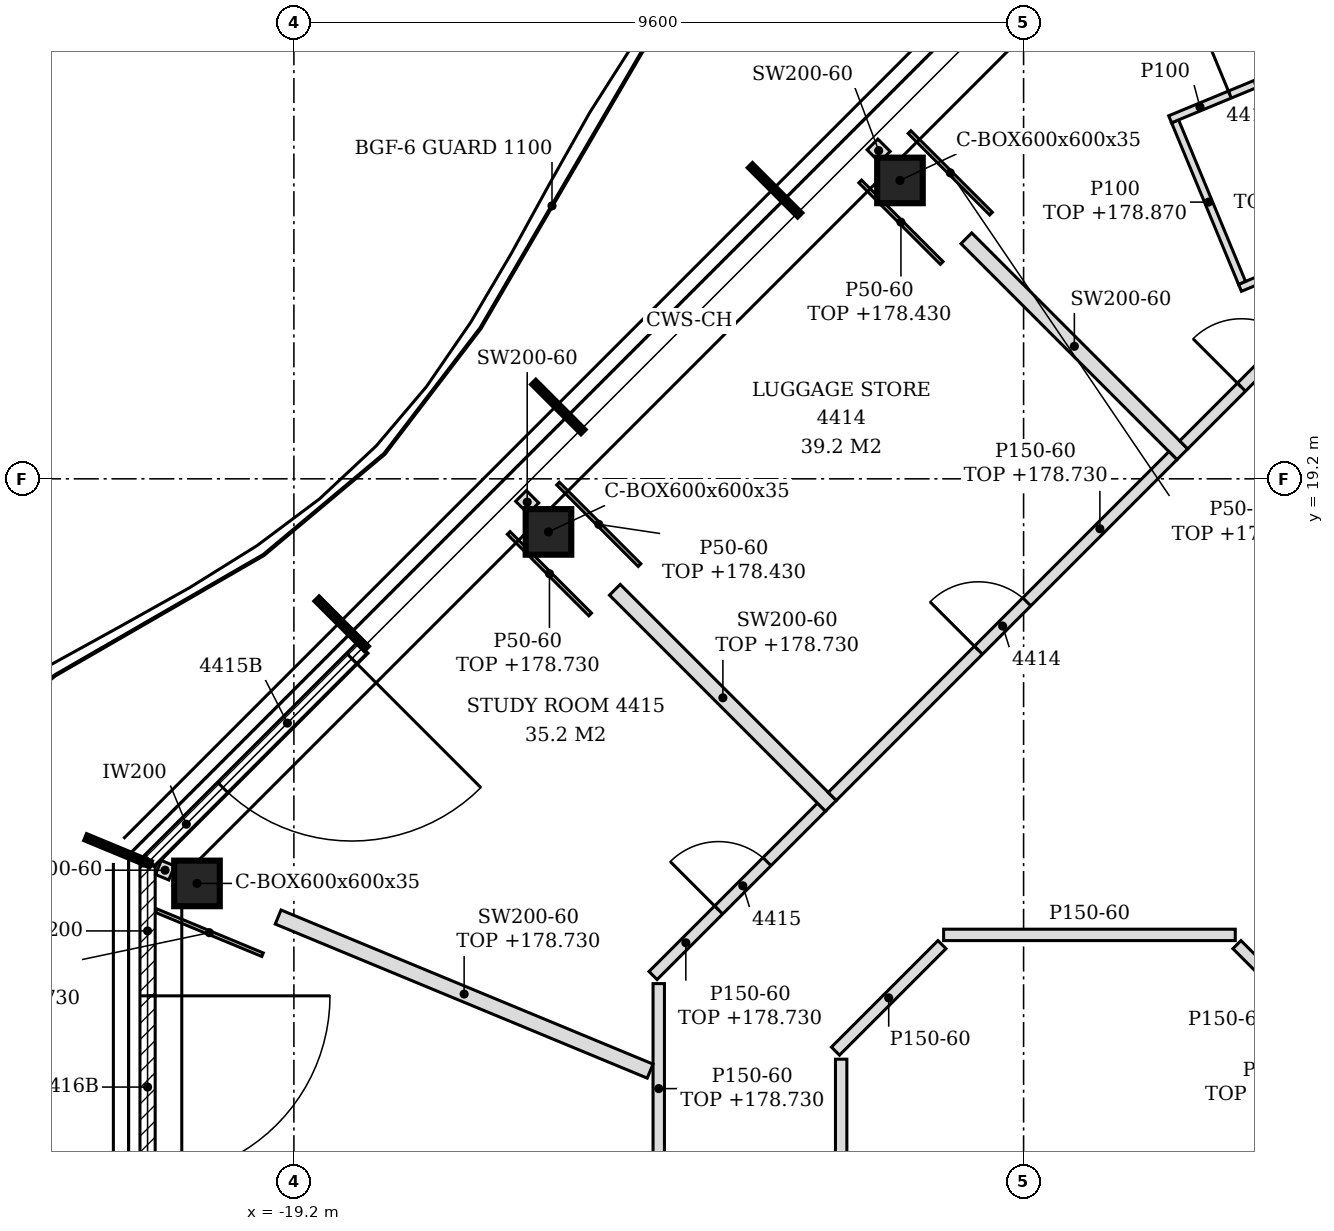
"""IFC4 building model, lengths in metres.
Left out: names, types, materials, properties, quantities, classifications, styles, units other than length and angle.
Written with IfcOpenShell. Run it as: python <this file> out.ifc"""

import sys

from ifc_helpers import new_model, si_unit, direction, frame, frame_2d, origin, origin_2d, place, context, subcontext, project, spatial, polyline, rectangle, hollow_rectangle, outline, extrude, clip, halfspace, element, fill, save


model = new_model("IFC4")
c1 = context("Model", 3, precision=1e-05, world=origin(), true_north=direction((0.0, 1.0)))
c2 = subcontext(c1, "Body", "Model", "MODEL_VIEW")
j1 = project(units=[si_unit("LENGTHUNIT", "METRE"), si_unit("PLANEANGLEUNIT", "RADIAN")], contexts=[c1])
p1 = place(None, origin())
s1 = spatial("IfcSite", under=j1, at=p1, CompositionType="ELEMENT")
p2 = place(p1, origin())
s2 = spatial("IfcBuilding", under=s1, at=p2, CompositionType="ELEMENT")
p3 = place(p2, frame((0.0, 0.0, 175.8)))
s3 = spatial("IfcBuildingStorey", under=s2, at=p3, CompositionType="ELEMENT", Elevation=175.8)
for number, where, z_axis, x_axis in (
    (1, (-11.227, 23.126, -0.15), (0.183, -0.122, 0.976), (0.555, 0.832, 0.0)),
    (2, (-15.851, 18.501, -0.15), (0.183, -0.122, 0.976), (0.555, 0.832, 0.0)),
    (3, (-20.475, 13.877, -0.15), (0.183, -0.122, 0.976), (0.555, 0.832, 0.0)),
):
    element("IfcColumn", number, at=place(p3, frame(where, z_axis=z_axis, x_axis=x_axis)), inside=s3, PredefinedType="COLUMN", context=c2, shape_type="Clipping", body=[
        clip(clip(extrude(hollow_rectangle(XDim=0.6, YDim=0.6, WallThickness=0.035, at=origin_2d()), origin(), (0.0, 0.0, 1.0), 3.69), halfspace(frame((0.0, 0.0, 0.022), z_axis=(0.0, 0.0, 1.0), x_axis=(1.0, 0.0, 0.0)), True)), halfspace(frame((0.0, 0.0, 3.67), z_axis=(0.0, 0.0, 1.0), x_axis=(1.0, 0.0, 0.0)), False)),
    ])
p4 = place(p3, frame((-18.295, 16.976, 0.0), z_axis=(0.0, 0.0, 1.0), x_axis=(-0.707137595296, -0.707075965734, 0.0)))
e4 = element("IfcWall", 4, at=p4, inside=s3, PredefinedType="NOTDEFINED", context=c2, shape_type="SweptSolid", body=[
    extrude(rectangle(XDim=3.961, YDim=0.2, at=frame_2d((1.981, 0.0))), origin(), (0.0, 0.0, 1.0), 3.45),
])
p5 = place(p4, frame((0.2, 0.0, 0.0)))
e5 = element("IfcOpeningElement", 5, at=p5, cuts=e4, PredefinedType="OPENING", context=c2, shape_type="SweptSolid", body=[
    extrude(rectangle(XDim=2.4, YDim=2.4, at=frame_2d((1.2, 1.2))), frame((0.0, 0.11, 0.0), z_axis=(0.0, -1.0, 0.0), x_axis=(1.0, 0.0, 0.0)), (0.0, 0.0, 1.0), 0.22),
])
p6 = place(p3, frame((-21.125, 14.106, 0.0), z_axis=(0.0, 0.0, 1.0), x_axis=(0.0, -1.0, 0.0)))
e6 = element("IfcWall", 6, at=p6, inside=s3, PredefinedType="NOTDEFINED", context=c2, shape_type="SweptSolid", body=[
    extrude(rectangle(XDim=4.626, YDim=0.2, at=frame_2d((2.313, 0.0))), origin(), (0.0, 0.0, 1.0), 3.45),
])
p7 = place(p6, frame((1.708, 0.0, 0.0)))
e7 = element("IfcOpeningElement", 7, at=p7, cuts=e6, PredefinedType="OPENING", context=c2, shape_type="SweptSolid", body=[
    extrude(rectangle(XDim=2.4, YDim=2.4, at=frame_2d((1.2, 1.2))), frame((0.0, 0.11, 0.0), z_axis=(0.0, -1.0, 0.0), x_axis=(1.0, 0.0, 0.0)), (0.0, 0.0, 1.0), 0.22),
])
p8 = place(p3, frame((-12.0, -1.125, 0.0), z_axis=(0.0, 0.0, 1.0), x_axis=(0.0, 1.0, 0.0)))
e8 = element("IfcWall", 8, at=p8, inside=s3, PredefinedType="PARTITIONING", context=c2, shape_type="SweptSolid", body=[
    extrude(outline(polyline([(0.0, 0.0), (12.69, 0.0), (12.69, 3.45), (10.225, 3.45), (10.223, 2.93), (10.025, 2.93), (10.023, 3.45), (5.425, 3.45), (5.423, 2.93), (5.225, 2.93), (5.223, 3.45), (0.625, 3.45), (0.623, 2.93), (0.425, 2.93), (0.423, 3.45), (0.0, 3.45), (0.0, 0.0)])), frame((0.0, 0.075, 0.0), z_axis=(0.0, -1.0, 0.0), x_axis=(1.0, 0.0, 0.0)), (0.0, 0.0, 1.0), 0.15),
])
p9 = place(p3, frame((-14.4, 9.796, 0.0), z_axis=(0.0, 0.0, 1.0), x_axis=(0.0, 1.0, 0.0)))
e9 = element("IfcWall", 9, at=p9, inside=s3, PredefinedType="PARTITIONING", context=c2, shape_type="SweptSolid", body=[
    extrude(rectangle(XDim=2.763, YDim=0.15, at=frame_2d((1.381, 0.0))), origin(), (0.0, 0.0, 1.0), 2.93),
])
p10 = place(p3, frame((-14.513, 11.408, 0.0), z_axis=(0.0, 0.0, 1.0), x_axis=(-0.923884829347, 0.382670644421, 0.0)))
e10 = element("IfcWall", 10, at=p10, inside=s3, PredefinedType="PARTITIONING", context=c2, shape_type="SweptSolid", body=[
    extrude(rectangle(XDim=5.297, YDim=0.2, at=frame_2d((2.649, 0.0))), origin(), (0.0, 0.0, 1.0), 2.93),
])
p11 = place(p3, frame((-12.075, 11.671, 0.0), z_axis=(0.0, 0.0, 1.0), x_axis=(0.707045167735, 0.70716838927, 0.0)))
e11 = element("IfcWall", 11, at=p11, inside=s3, PredefinedType="PARTITIONING", context=c2, shape_type="SweptSolid", body=[
    extrude(rectangle(XDim=1.981, YDim=0.15, at=frame_2d((0.991, 0.0))), origin(), (0.0, 0.0, 1.0), 3.45),
])
p12 = place(p3, frame((-5.914, 12.192, 0.0), z_axis=(0.0, 0.0, 1.0), x_axis=(-0.706812296552, 0.70740114323, 0.0)))
e12 = element("IfcWall", 12, at=p12, inside=s3, PredefinedType="PARTITIONING", context=c2, shape_type="SweptSolid", body=[
    extrude(rectangle(XDim=1.244, YDim=0.15, at=frame_2d((0.622, 0.0))), origin(), (0.0, 0.0, 1.0), 3.45),
])
p13 = place(p3, frame((-14.475, 12.665, 0.0), z_axis=(0.0, 0.0, 1.0), x_axis=(0.70726258305, 0.706950944987, 0.0)))
e13 = element("IfcWall", 13, at=p13, inside=s3, PredefinedType="PARTITIONING", context=c2, shape_type="SweptSolid", body=[
    extrude(rectangle(XDim=3.134, YDim=0.15, at=frame_2d((1.567, 0.0))), origin(), (0.0, 0.0, 1.0), 2.93),
])
p14 = place(p13, frame((1.22, 0.0, 0.0)))
e14 = element("IfcOpeningElement", 14, at=p14, cuts=e13, PredefinedType="OPENING", context=c2, shape_type="SweptSolid", body=[
    extrude(rectangle(XDim=0.9, YDim=2.1, at=frame_2d((0.45, 1.05))), frame((0.0, 0.085, 0.0), z_axis=(0.0, -1.0, 0.0), x_axis=(1.0, 0.0, 0.0)), (0.0, 0.0, 1.0), 0.17),
])
p15 = place(p3, frame((-10.652, 13.2, 0.0), z_axis=(0.0, 0.0, 1.0), x_axis=(1.0, 0.0, 0.0)))
e15 = element("IfcWall", 15, at=p15, inside=s3, PredefinedType="PARTITIONING", context=c2, shape_type="SweptSolid", body=[
    extrude(rectangle(XDim=3.837, YDim=0.15, at=frame_2d((1.918, 0.0))), origin(), (0.0, 0.0, 1.0), 3.45),
])
p16 = place(p3, frame((-20.808, 14.015, 0.0), z_axis=(0.0, 0.0, 1.0), x_axis=(-0.92368644112, 0.383149263984, 0.0)))
e16 = element("IfcWall", 16, at=p16, inside=s3, PredefinedType="PARTITIONING", context=c2, shape_type="SweptSolid", body=[
    extrude(rectangle(XDim=0.189, YDim=0.2, at=frame_2d((0.095, 0.0))), origin(), (0.0, 0.0, 1.0), 3.45),
])
p17 = place(p3, frame((-12.135, 14.898, 0.0), z_axis=(0.0, 0.0, 1.0), x_axis=(-0.707106781187, 0.707106781187, 0.0)))
e17 = element("IfcWall", 17, at=p17, inside=s3, PredefinedType="PARTITIONING", context=c2, shape_type="SweptSolid", body=[
    extrude(rectangle(XDim=4.02, YDim=0.2, at=frame_2d((2.01, 0.0))), origin(), (0.0, 0.0, 1.0), 2.93),
])
p18 = place(p3, frame((-12.117, 15.022, 0.0), z_axis=(0.0, 0.0, 1.0), x_axis=(0.70701050414, 0.707203045127, 0.0)))
e18 = element("IfcWall", 18, at=p18, inside=s3, PredefinedType="PARTITIONING", context=c2, shape_type="SweptSolid", body=[
    extrude(rectangle(XDim=6.34, YDim=0.15, at=frame_2d((3.17, 0.0))), origin(), (0.0, 0.0, 1.0), 2.93),
])
p19 = place(p18, frame((2.72, 0.0, 0.0)))
e19 = element("IfcOpeningElement", 19, at=p19, cuts=e18, PredefinedType="OPENING", context=c2, shape_type="SweptSolid", body=[
    extrude(rectangle(XDim=0.9, YDim=2.1, at=frame_2d((0.45, 1.05))), frame((0.0, 0.085, 0.0), z_axis=(0.0, -1.0, 0.0), x_axis=(1.0, 0.0, 0.0)), (0.0, 0.0, 1.0), 0.17),
])
p20 = place(p3, frame((-16.049, 18.812, 0.0), z_axis=(0.0, 0.0, 1.0), x_axis=(-0.707637841256, 0.706575321974, 0.0)))
e20 = element("IfcWall", 20, at=p20, inside=s3, PredefinedType="PARTITIONING", context=c2, shape_type="SweptSolid", body=[
    extrude(rectangle(XDim=0.23, YDim=0.2, at=frame_2d((0.115, 0.0))), origin(), (0.0, 0.0, 1.0), 3.45),
])
p21 = place(p3, frame((-7.511, 19.523, 0.0), z_axis=(0.0, 0.0, 1.0), x_axis=(-0.707167526582, 0.707046030572, 0.0)))
e21 = element("IfcWall", 21, at=p21, inside=s3, PredefinedType="PARTITIONING", context=c2, shape_type="SweptSolid", body=[
    extrude(rectangle(XDim=4.019, YDim=0.2, at=frame_2d((2.009, 0.0))), origin(), (0.0, 0.0, 1.0), 3.45),
])
p22 = place(p3, frame((-7.493, 19.647, 0.0), z_axis=(0.0, 0.0, 1.0), x_axis=(0.707136494677, 0.707077066448, 0.0)))
e22 = element("IfcWall", 22, at=p22, inside=s3, PredefinedType="PARTITIONING", context=c2, shape_type="SweptSolid", body=[
    extrude(rectangle(XDim=4.108, YDim=0.15, at=frame_2d((2.054, 0.0))), origin(), (0.0, 0.0, 1.0), 2.73),
])
p23 = place(p22, frame((1.074, 0.0, 0.0)))
e23 = element("IfcOpeningElement", 23, at=p23, cuts=e22, PredefinedType="OPENING", context=c2, shape_type="SweptSolid", body=[
    extrude(rectangle(XDim=0.9, YDim=2.1, at=frame_2d((0.45, 1.05))), frame((0.0, 0.085, 0.0), z_axis=(0.0, -1.0, 0.0), x_axis=(1.0, 0.0, 0.0)), (0.0, 0.0, 1.0), 0.17),
])
p24 = place(p3, frame((-6.753, 21.713, 0.0), z_axis=(0.0, 0.0, 1.0), x_axis=(0.923907921622, 0.382614887798, 0.0)))
e24 = element("IfcWall", 24, at=p24, inside=s3, PredefinedType="PARTITIONING", context=c2, shape_type="SweptSolid", body=[
    extrude(rectangle(XDim=2.349, YDim=0.1, at=frame_2d((1.175, 0.0))), origin(), (0.0, 0.0, 1.0), 2.73),
])
p25 = place(p3, frame((-6.726, 21.778, 0.0), z_axis=(0.0, 0.0, 1.0), x_axis=(-0.382911179632, 0.923785163614, 0.0)))
e25 = element("IfcWall", 25, at=p25, inside=s3, PredefinedType="PARTITIONING", context=c2, shape_type="SweptSolid", body=[
    extrude(rectangle(XDim=2.3, YDim=0.1, at=frame_2d((1.15, 0.0))), origin(), (0.0, 0.0, 1.0), 3.07),
])
p26 = place(p3, frame((-11.425, 23.437, 0.0), z_axis=(0.0, 0.0, 1.0), x_axis=(-0.707637841256, 0.706575321974, 0.0)))
e26 = element("IfcWall", 26, at=p26, inside=s3, PredefinedType="PARTITIONING", context=c2, shape_type="SweptSolid", body=[
    extrude(rectangle(XDim=0.23, YDim=0.2, at=frame_2d((0.115, 0.0))), origin(), (0.0, 0.0, 1.0), 3.45),
])
p27 = place(p3, frame((-7.672, 23.93, 0.0), z_axis=(0.0, 0.0, 1.0), x_axis=(0.923968736757, 0.382468003231, 0.0)))
e27 = element("IfcWall", 27, at=p27, inside=s3, PredefinedType="PARTITIONING", context=c2, shape_type="SweptSolid", body=[
    extrude(rectangle(XDim=2.35, YDim=0.1, at=frame_2d((1.175, 0.0))), origin(), (0.0, 0.0, 1.0), 3.45),
])
p28 = place(p27, frame((0.851, 0.0, 0.0)))
e28 = element("IfcOpeningElement", 28, at=p28, cuts=e27, PredefinedType="OPENING", context=c2, shape_type="SweptSolid", body=[
    extrude(rectangle(XDim=0.8, YDim=2.1, at=frame_2d((0.4, 1.05))), frame((0.0, 0.06, 0.0), z_axis=(0.0, -1.0, 0.0), x_axis=(1.0, 0.0, 0.0)), (0.0, 0.0, 1.0), 0.12),
])
p29 = place(p3, frame((-19.613, 12.939, 0.0), z_axis=(0.0, 0.0, 1.0), x_axis=(-0.923851894913, 0.382750148616, 0.0)))
e29 = element("IfcWall", 29, at=p29, inside=s3, PredefinedType="PARTITIONING", context=c2, shape_type="SweptSolid", body=[
    extrude(rectangle(XDim=1.516, YDim=0.05, at=frame_2d((0.758, 0.0))), origin(), (0.0, 0.0, 1.0), 2.93),
])
p30 = place(p3, frame((-15.302, 17.416, 0.0), z_axis=(0.0, 0.0, 1.0), x_axis=(-0.707026268033, 0.707187285174, 0.0)))
e30 = element("IfcWall", 30, at=p30, inside=s3, PredefinedType="PARTITIONING", context=c2, shape_type="SweptSolid", body=[
    extrude(rectangle(XDim=1.516, YDim=0.05, at=frame_2d((0.758, 0.0))), origin(), (0.0, 0.0, 1.0), 2.93),
])
p31 = place(p3, frame((-14.653, 18.065, 0.0), z_axis=(0.0, 0.0, 1.0), x_axis=(-0.707026268033, 0.707187285174, 0.0)))
e31 = element("IfcWall", 31, at=p31, inside=s3, PredefinedType="PARTITIONING", context=c2, shape_type="SweptSolid", body=[
    extrude(rectangle(XDim=1.516, YDim=0.05, at=frame_2d((0.758, 0.0))), origin(), (0.0, 0.0, 1.0), 2.63),
])
p32 = place(p3, frame((-10.677, 22.04, 0.0), z_axis=(0.0, 0.0, 1.0), x_axis=(-0.707106781187, 0.707106781187, 0.0)))
e32 = element("IfcWall", 32, at=p32, inside=s3, PredefinedType="PARTITIONING", context=c2, shape_type="SweptSolid", body=[
    extrude(rectangle(XDim=1.516, YDim=0.05, at=frame_2d((0.758, 0.0))), origin(), (0.0, 0.0, 1.0), 2.63),
])
p33 = place(p3, frame((-10.028, 22.689, 0.0), z_axis=(0.0, 0.0, 1.0), x_axis=(-0.707187285174, 0.707026268033, 0.0)))
e33 = element("IfcWall", 33, at=p33, inside=s3, PredefinedType="PARTITIONING", context=c2, shape_type="SweptSolid", body=[
    extrude(rectangle(XDim=1.516, YDim=0.05, at=frame_2d((0.758, 0.0))), origin(), (0.0, 0.0, 1.0), 2.93),
])
p34 = place(p5, origin())
e34 = element("IfcDoor", 34, at=p34, inside=s3, OperationType="SINGLE_SWING_LEFT", PredefinedType="DOOR", context=c2, shape_type="SweptSolid", body=[
    extrude(rectangle(XDim=2.4, YDim=2.4, at=frame_2d((1.2, 1.2))), frame((0.0, 0.025, 0.0), z_axis=(0.0, -1.0, 0.0), x_axis=(1.0, 0.0, 0.0)), (0.0, 0.0, 1.0), 0.05),
])
fill(e5, e34)
p35 = place(p7, origin())
e35 = element("IfcDoor", 35, at=p35, inside=s3, OperationType="SINGLE_SWING_LEFT", PredefinedType="DOOR", context=c2, shape_type="SweptSolid", body=[
    extrude(rectangle(XDim=2.4, YDim=2.4, at=frame_2d((1.2, 1.2))), frame((0.0, 0.025, 0.0), z_axis=(0.0, -1.0, 0.0), x_axis=(1.0, 0.0, 0.0)), (0.0, 0.0, 1.0), 0.05),
])
fill(e7, e35)
p36 = place(p23, origin())
e36 = element("IfcDoor", 36, at=p36, inside=s3, OperationType="SINGLE_SWING_LEFT", PredefinedType="DOOR", context=c2, shape_type="SweptSolid", body=[
    extrude(rectangle(XDim=0.9, YDim=2.1, at=frame_2d((0.45, 1.05))), frame((0.0, 0.025, 0.0), z_axis=(0.0, -1.0, 0.0), x_axis=(1.0, 0.0, 0.0)), (0.0, 0.0, 1.0), 0.05),
])
fill(e23, e36)
p37 = place(p28, origin())
e37 = element("IfcDoor", 37, at=p37, inside=s3, OperationType="SINGLE_SWING_LEFT", PredefinedType="DOOR", context=c2, shape_type="SweptSolid", body=[
    extrude(rectangle(XDim=0.8, YDim=2.1, at=frame_2d((0.4, 1.05))), frame((0.0, 0.025, 0.0), z_axis=(0.0, -1.0, 0.0), x_axis=(1.0, 0.0, 0.0)), (0.0, 0.0, 1.0), 0.05),
])
fill(e28, e37)
p38 = place(p19, origin())
e38 = element("IfcDoor", 38, at=p38, inside=s3, OperationType="SINGLE_SWING_LEFT", PredefinedType="DOOR", context=c2, shape_type="SweptSolid", body=[
    extrude(rectangle(XDim=0.9, YDim=2.1, at=frame_2d((0.45, 1.05))), frame((0.0, 0.025, 0.0), z_axis=(0.0, -1.0, 0.0), x_axis=(1.0, 0.0, 0.0)), (0.0, 0.0, 1.0), 0.05),
])
fill(e19, e38)
p39 = place(p14, origin())
e39 = element("IfcDoor", 39, at=p39, inside=s3, OperationType="SINGLE_SWING_LEFT", PredefinedType="DOOR", context=c2, shape_type="SweptSolid", body=[
    extrude(rectangle(XDim=0.9, YDim=2.1, at=frame_2d((0.45, 1.05))), frame((0.0, 0.025, 0.0), z_axis=(0.0, -1.0, 0.0), x_axis=(1.0, 0.0, 0.0)), (0.0, 0.0, 1.0), 0.05),
])
fill(e14, e39)
save(model, sys.argv[1])
